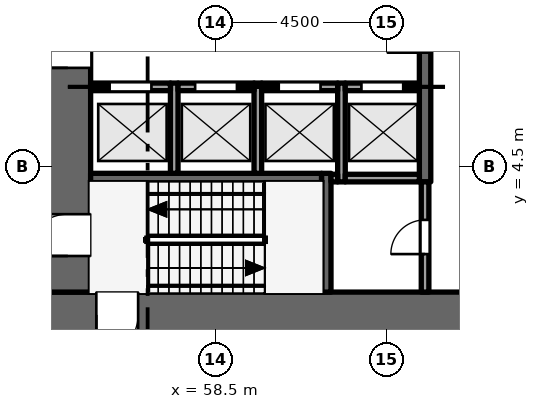
"""IFC4 building model, lengths in metres.
Left out: names, types, materials, properties, quantities, classifications, styles, units other than length and angle.
Written with IfcOpenShell. Run it as: python <this file> out.ifc"""

import sys

from ifc_helpers import new_model, si_unit, direction, frame, frame_2d, origin, place, context, subcontext, project, spatial, rectangle, extrude, element, fill, save


model = new_model("IFC4")
c1 = context("Model", 3, precision=1e-05, world=origin(), true_north=direction((0.0, 1.0)))
c2 = subcontext(c1, "Body", "Model", "MODEL_VIEW")
j1 = project(units=[si_unit("LENGTHUNIT", "METRE"), si_unit("PLANEANGLEUNIT", "RADIAN")], contexts=[c1])
p1 = place(None, origin())
s1 = spatial("IfcSite", under=j1, at=p1, CompositionType="ELEMENT")
p2 = place(p1, origin())
s2 = spatial("IfcBuilding", under=s1, at=p2, CompositionType="ELEMENT")
p3 = place(p2, origin())
s3 = spatial("IfcBuildingStorey", under=s2, at=p3, CompositionType="ELEMENT", Elevation=0.0)
p4 = place(p3, frame((67.5, 0.6, -0.3), z_axis=(0.0, 0.0, 1.0), x_axis=(-1.0, 0.0, 0.0)))
e1 = element("IfcWall", 1, at=p4, inside=s3, PredefinedType="SHEAR", context=c2, shape_type="SweptSolid", body=[
    extrude(rectangle(XDim=13.5, YDim=1.2, at=frame_2d((6.75, 0.0))), origin(), (0.0, 0.0, 1.0), 8.15),
])
p5 = place(p4, frame((11.05, 0.0, 0.3)))
e2 = element("IfcOpeningElement", 2, at=p5, cuts=e1, PredefinedType="OPENING", context=c2, shape_type="SweptSolid", body=[
    extrude(rectangle(XDim=1.1, YDim=2.1, at=frame_2d((0.55, 1.05))), frame((0.0, 0.61, 0.0), z_axis=(0.0, -1.0, 0.0), x_axis=(1.0, 0.0, 0.0)), (0.0, 0.0, 1.0), 1.22),
])
p6 = place(p3, frame((54.6, 1.2, -0.3), z_axis=(0.0, 0.0, 1.0), x_axis=(0.0, 1.0, 0.0)))
e3 = element("IfcWall", 3, at=p6, inside=s3, PredefinedType="SHEAR", context=c2, shape_type="SweptSolid", body=[
    extrude(rectangle(XDim=20.1, YDim=1.2, at=frame_2d((10.05, 0.0))), origin(), (0.0, 0.0, 1.0), 8.15),
])
p7 = place(p6, frame((5.9, 0.0, 0.3)))
e4 = element("IfcOpeningElement", 4, at=p7, cuts=e3, PredefinedType="OPENING", context=c2, shape_type="SweptSolid", body=[
    extrude(rectangle(XDim=1.8, YDim=2.1, at=frame_2d((0.9, 1.05))), frame((0.0, 0.61, 0.0), z_axis=(0.0, -1.0, 0.0), x_axis=(1.0, 0.0, 0.0)), (0.0, 0.0, 1.0), 1.22),
])
p8 = place(p6, frame((11.95, 0.0, 0.3)))
e5 = element("IfcOpeningElement", 5, at=p8, cuts=e3, PredefinedType="OPENING", context=c2, shape_type="SweptSolid", body=[
    extrude(rectangle(XDim=1.1, YDim=2.1, at=frame_2d((0.55, 1.05))), frame((0.0, 0.61, 0.0), z_axis=(0.0, -1.0, 0.0), x_axis=(1.0, 0.0, 0.0)), (0.0, 0.0, 1.0), 1.22),
])
p9 = place(p6, frame((0.95, 0.0, 0.3)))
e6 = element("IfcOpeningElement", 6, at=p9, cuts=e3, PredefinedType="OPENING", context=c2, shape_type="SweptSolid", body=[
    extrude(rectangle(XDim=1.1, YDim=2.1, at=frame_2d((0.55, 1.05))), frame((0.0, 0.61, 0.0), z_axis=(0.0, -1.0, 0.0), x_axis=(1.0, 0.0, 0.0)), (0.0, 0.0, 1.0), 1.22),
])
p10 = place(p6, frame((18.15, 0.0, 0.3)))
e7 = element("IfcOpeningElement", 7, at=p10, cuts=e3, PredefinedType="OPENING", context=c2, shape_type="SweptSolid", body=[
    extrude(rectangle(XDim=1.1, YDim=2.1, at=frame_2d((0.55, 1.05))), frame((0.0, 0.61, 0.0), z_axis=(0.0, -1.0, 0.0), x_axis=(1.0, 0.0, 0.0)), (0.0, 0.0, 1.0), 1.22),
])
for number, where, z_axis, x_axis in (
    (8, (57.4, 4.325, 0.0), (0.0, 0.0, 1.0), (0.0, 1.0, 0.0)),
    (9, (59.6, 4.325, 0.0), (0.0, 0.0, 1.0), (0.0, 1.0, 0.0)),
):
    element("IfcWall", number, at=place(p3, frame(where, z_axis=z_axis, x_axis=x_axis)), inside=s3, PredefinedType="SOLIDWALL", context=c2, shape_type="SweptSolid", body=[
        extrude(rectangle(XDim=2.375, YDim=0.2, at=frame_2d((1.188, 0.0))), origin(), (0.0, 0.0, 1.0), 7.75),
    ])
p11 = place(p3, frame((61.4, 1.2, 0.0), z_axis=(0.0, 0.0, 1.0), x_axis=(0.0, 1.0, 0.0)))
e10 = element("IfcWall", 10, at=p11, inside=s3, PredefinedType="SHEAR", context=c2, shape_type="SweptSolid", body=[
    extrude(rectangle(XDim=3.125, YDim=0.25, at=frame_2d((1.562, 0.0))), origin(), (0.0, 0.0, 1.0), 7.75),
])
p12 = place(p3, frame((61.8, 4.1, 0.0), z_axis=(0.0, 0.0, 1.0), x_axis=(0.0, 1.0, 0.0)))
e11 = element("IfcWall", 11, at=p12, inside=s3, PredefinedType="SOLIDWALL", context=c2, shape_type="SweptSolid", body=[
    extrude(rectangle(XDim=2.6, YDim=0.2, at=frame_2d((1.3, 0.0))), origin(), (0.0, 0.0, 1.0), 7.75),
])
p13 = place(p3, frame((64.0, 1.2, 0.0), z_axis=(0.0, 0.0, 1.0), x_axis=(0.0, 1.0, 0.0)))
e12 = element("IfcWall", 12, at=p13, inside=s3, PredefinedType="PARTITIONING", context=c2, shape_type="SweptSolid", body=[
    extrude(rectangle(XDim=2.9, YDim=0.2, at=frame_2d((1.45, 0.0))), origin(), (0.0, 0.0, 1.0), 7.75),
])
p14 = place(p13, frame((1.0, 0.0, 0.0)))
e13 = element("IfcOpeningElement", 13, at=p14, cuts=e12, PredefinedType="OPENING", context=c2, shape_type="SweptSolid", body=[
    extrude(rectangle(XDim=0.9, YDim=2.1, at=frame_2d((0.45, 1.05))), frame((0.0, 0.11, 0.0), z_axis=(0.0, -1.0, 0.0), x_axis=(1.0, 0.0, 0.0)), (0.0, 0.0, 1.0), 0.22),
])
p15 = place(p3, frame((64.0, 4.1, 0.0), z_axis=(0.0, 0.0, 1.0), x_axis=(0.0, 1.0, 0.0)))
e14 = element("IfcWall", 14, at=p15, inside=s3, PredefinedType="SHEAR", context=c2, shape_type="SweptSolid", body=[
    extrude(rectangle(XDim=14.5, YDim=0.3, at=frame_2d((7.25, 0.0))), origin(), (0.0, 0.0, 1.0), 7.75),
])
p16 = place(p15, frame((3.4, 0.0, 0.0)))
e15 = element("IfcOpeningElement", 15, at=p16, cuts=e14, PredefinedType="OPENING", context=c2, shape_type="SweptSolid", body=[
    extrude(rectangle(XDim=1.0, YDim=2.1, at=frame_2d((0.5, 1.05))), frame((0.0, 0.16, 0.0), z_axis=(0.0, -1.0, 0.0), x_axis=(1.0, 0.0, 0.0)), (0.0, 0.0, 1.0), 0.32),
])
p17 = place(p15, frame((9.1, 0.0, 0.0)))
e16 = element("IfcOpeningElement", 16, at=p17, cuts=e14, PredefinedType="OPENING", context=c2, shape_type="SweptSolid", body=[
    extrude(rectangle(XDim=1.0, YDim=2.1, at=frame_2d((0.5, 1.05))), frame((0.0, 0.16, 0.0), z_axis=(0.0, -1.0, 0.0), x_axis=(1.0, 0.0, 0.0)), (0.0, 0.0, 1.0), 0.32),
])
p18 = place(p3, frame((55.2, 4.2, 0.0), z_axis=(0.0, 0.0, 1.0), x_axis=(1.0, 0.0, 0.0)))
e17 = element("IfcWall", 17, at=p18, inside=s3, PredefinedType="SHEAR", context=c2, shape_type="SweptSolid", body=[
    extrude(rectangle(XDim=6.075, YDim=0.25, at=frame_2d((3.038, 0.0))), origin(), (0.0, 0.0, 1.0), 7.75),
])
p19 = place(p3, frame((61.525, 4.2, 0.0), z_axis=(0.0, 0.0, 1.0), x_axis=(1.0, 0.0, 0.0)))
e18 = element("IfcWall", 18, at=p19, inside=s3, PredefinedType="SOLIDWALL", context=c2, shape_type="SweptSolid", body=[
    extrude(rectangle(XDim=0.175, YDim=0.2, at=frame_2d((0.087, 0.0))), origin(), (0.0, 0.0, 1.0), 7.75),
])
p20 = place(p3, frame((61.9, 4.2, 0.0), z_axis=(0.0, 0.0, 1.0), x_axis=(1.0, 0.0, 0.0)))
e19 = element("IfcWall", 19, at=p20, inside=s3, PredefinedType="SOLIDWALL", context=c2, shape_type="SweptSolid", body=[
    extrude(rectangle(XDim=1.95, YDim=0.2, at=frame_2d((0.975, 0.0))), origin(), (0.0, 0.0, 1.0), 7.75),
])
p21 = place(p3, frame((55.2, 6.6, 0.0), z_axis=(0.0, 0.0, 1.0), x_axis=(1.0, 0.0, 0.0)))
e20 = element("IfcWall", 20, at=p21, inside=s3, PredefinedType="SOLIDWALL", context=c2, shape_type="SweptSolid", body=[
    extrude(rectangle(XDim=2.1, YDim=0.2, at=frame_2d((1.05, 0.0))), origin(), (0.0, 0.0, 1.0), 7.75),
])
p22 = place(p21, frame((0.5, 0.0, 0.012)))
e21 = element("IfcOpeningElement", 21, at=p22, cuts=e20, PredefinedType="OPENING", context=c2, shape_type="SweptSolid", body=[
    extrude(rectangle(XDim=1.1, YDim=2.1, at=frame_2d((0.55, 1.05))), frame((0.0, 0.11, 0.0), z_axis=(0.0, -1.0, 0.0), x_axis=(1.0, 0.0, 0.0)), (0.0, 0.0, 1.0), 0.22),
])
p23 = place(p3, frame((57.5, 6.6, 0.0), z_axis=(0.0, 0.0, 1.0), x_axis=(1.0, 0.0, 0.0)))
e22 = element("IfcWall", 22, at=p23, inside=s3, PredefinedType="SOLIDWALL", context=c2, shape_type="SweptSolid", body=[
    extrude(rectangle(XDim=2.0, YDim=0.2, at=frame_2d((1.0, 0.0))), origin(), (0.0, 0.0, 1.0), 7.75),
])
p24 = place(p23, frame((0.45, 0.0, 0.012)))
e23 = element("IfcOpeningElement", 23, at=p24, cuts=e22, PredefinedType="OPENING", context=c2, shape_type="SweptSolid", body=[
    extrude(rectangle(XDim=1.1, YDim=2.1, at=frame_2d((0.55, 1.05))), frame((0.0, 0.11, 0.0), z_axis=(0.0, -1.0, 0.0), x_axis=(1.0, 0.0, 0.0)), (0.0, 0.0, 1.0), 0.22),
])
p25 = place(p3, frame((59.7, 6.6, 0.0), z_axis=(0.0, 0.0, 1.0), x_axis=(1.0, 0.0, 0.0)))
e24 = element("IfcWall", 24, at=p25, inside=s3, PredefinedType="SOLIDWALL", context=c2, shape_type="SweptSolid", body=[
    extrude(rectangle(XDim=2.0, YDim=0.2, at=frame_2d((1.0, 0.0))), origin(), (0.0, 0.0, 1.0), 7.75),
])
p26 = place(p25, frame((0.45, 0.0, 0.012)))
e25 = element("IfcOpeningElement", 25, at=p26, cuts=e24, PredefinedType="OPENING", context=c2, shape_type="SweptSolid", body=[
    extrude(rectangle(XDim=1.1, YDim=2.1, at=frame_2d((0.55, 1.05))), frame((0.0, 0.11, 0.0), z_axis=(0.0, -1.0, 0.0), x_axis=(1.0, 0.0, 0.0)), (0.0, 0.0, 1.0), 0.22),
])
p27 = place(p3, frame((61.9, 6.6, 0.0), z_axis=(0.0, 0.0, 1.0), x_axis=(1.0, 0.0, 0.0)))
e26 = element("IfcWall", 26, at=p27, inside=s3, PredefinedType="SOLIDWALL", context=c2, shape_type="SweptSolid", body=[
    extrude(rectangle(XDim=1.95, YDim=0.2, at=frame_2d((0.975, 0.0))), origin(), (0.0, 0.0, 1.0), 7.75),
])
p28 = place(p27, frame((0.425, 0.0, 0.012)))
e27 = element("IfcOpeningElement", 27, at=p28, cuts=e26, PredefinedType="OPENING", context=c2, shape_type="SweptSolid", body=[
    extrude(rectangle(XDim=1.1, YDim=2.1, at=frame_2d((0.55, 1.05))), frame((0.0, 0.11, 0.0), z_axis=(0.0, -1.0, 0.0), x_axis=(1.0, 0.0, 0.0)), (0.0, 0.0, 1.0), 0.22),
])
p29 = place(p22, origin())
e28 = element("IfcDoor", 28, at=p29, inside=s3, OperationType="SLIDING_TO_LEFT", PredefinedType="DOOR", context=c2, shape_type="SweptSolid", body=[
    extrude(rectangle(XDim=1.1, YDim=2.1, at=frame_2d((0.55, 1.05))), frame((0.0, 0.025, 0.0), z_axis=(0.0, -1.0, 0.0), x_axis=(1.0, 0.0, 0.0)), (0.0, 0.0, 1.0), 0.05),
])
fill(e21, e28)
p30 = place(p24, origin())
e29 = element("IfcDoor", 29, at=p30, inside=s3, OperationType="SLIDING_TO_RIGHT", PredefinedType="DOOR", context=c2, shape_type="SweptSolid", body=[
    extrude(rectangle(XDim=1.1, YDim=2.1, at=frame_2d((0.55, 1.05))), frame((0.0, 0.025, 0.0), z_axis=(0.0, -1.0, 0.0), x_axis=(1.0, 0.0, 0.0)), (0.0, 0.0, 1.0), 0.05),
])
fill(e23, e29)
p31 = place(p26, origin())
e30 = element("IfcDoor", 30, at=p31, inside=s3, OperationType="SLIDING_TO_LEFT", PredefinedType="DOOR", context=c2, shape_type="SweptSolid", body=[
    extrude(rectangle(XDim=1.1, YDim=2.1, at=frame_2d((0.55, 1.05))), frame((0.0, 0.025, 0.0), z_axis=(0.0, -1.0, 0.0), x_axis=(1.0, 0.0, 0.0)), (0.0, 0.0, 1.0), 0.05),
])
fill(e25, e30)
p32 = place(p28, origin())
e31 = element("IfcDoor", 31, at=p32, inside=s3, OperationType="SLIDING_TO_RIGHT", PredefinedType="DOOR", context=c2, shape_type="SweptSolid", body=[
    extrude(rectangle(XDim=1.1, YDim=2.1, at=frame_2d((0.55, 1.05))), frame((0.0, 0.025, 0.0), z_axis=(0.0, -1.0, 0.0), x_axis=(1.0, 0.0, 0.0)), (0.0, 0.0, 1.0), 0.05),
])
fill(e27, e31)
p33 = place(p7, origin())
e32 = element("IfcDoor", 32, at=p33, inside=s3, OperationType="DOUBLE_DOOR_SINGLE_SWING", PredefinedType="DOOR", context=c2, shape_type="SweptSolid", body=[
    extrude(rectangle(XDim=1.8, YDim=2.1, at=frame_2d((0.9, 1.05))), frame((0.0, 0.025, 0.0), z_axis=(0.0, -1.0, 0.0), x_axis=(1.0, 0.0, 0.0)), (0.0, 0.0, 1.0), 0.05),
])
fill(e4, e32)
p34 = place(p9, origin())
e33 = element("IfcDoor", 33, at=p34, inside=s3, OperationType="SINGLE_SWING_LEFT", PredefinedType="DOOR", context=c2, shape_type="SweptSolid", body=[
    extrude(rectangle(XDim=1.1, YDim=2.1, at=frame_2d((0.55, 1.05))), frame((0.0, 0.025, 0.0), z_axis=(0.0, -1.0, 0.0), x_axis=(1.0, 0.0, 0.0)), (0.0, 0.0, 1.0), 0.05),
])
fill(e6, e33)
p35 = place(p5, origin())
e34 = element("IfcDoor", 34, at=p35, inside=s3, OperationType="SINGLE_SWING_RIGHT", PredefinedType="DOOR", context=c2, shape_type="SweptSolid", body=[
    extrude(rectangle(XDim=1.1, YDim=2.1, at=frame_2d((0.55, 1.05))), frame((0.0, 0.025, 0.0), z_axis=(0.0, -1.0, 0.0), x_axis=(1.0, 0.0, 0.0)), (0.0, 0.0, 1.0), 0.05),
])
fill(e2, e34)
p36 = place(p14, origin())
e35 = element("IfcDoor", 35, at=p36, inside=s3, OperationType="SINGLE_SWING_LEFT", PredefinedType="DOOR", context=c2, shape_type="SweptSolid", body=[
    extrude(rectangle(XDim=0.9, YDim=2.1, at=frame_2d((0.45, 1.05))), frame((0.0, 0.025, 0.0), z_axis=(0.0, -1.0, 0.0), x_axis=(1.0, 0.0, 0.0)), (0.0, 0.0, 1.0), 0.05),
])
fill(e13, e35)
save(model, sys.argv[1])
